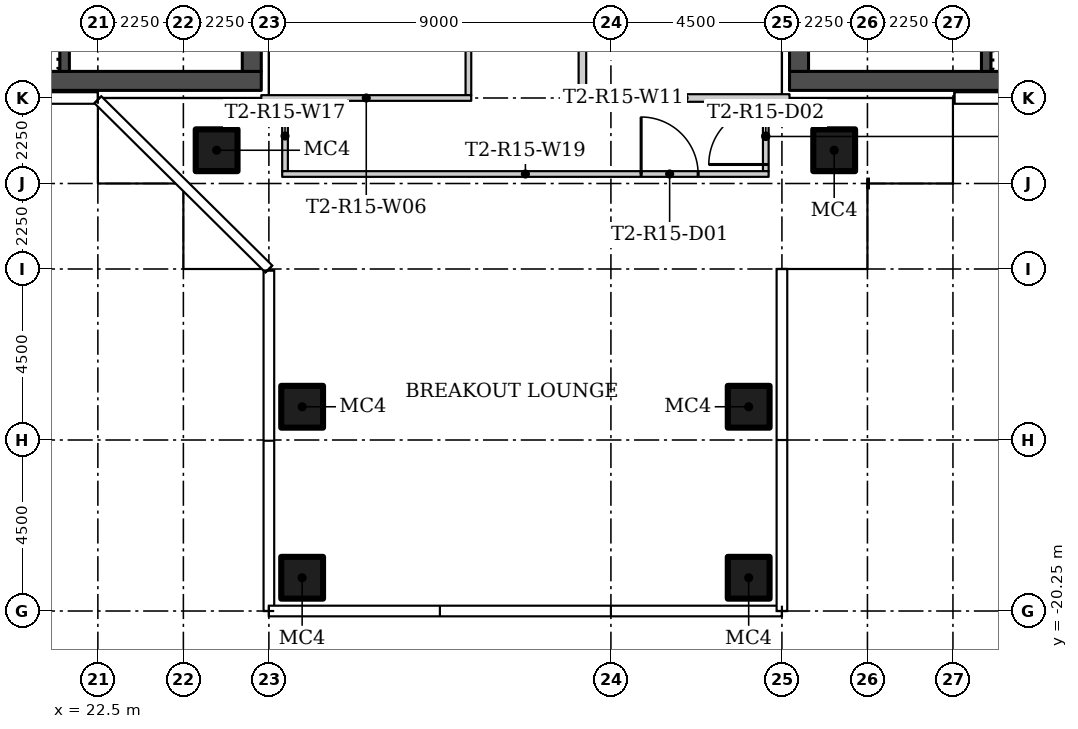
"""IFC4 building model, lengths in metres.
Left out: names, types, materials, properties, quantities, classifications, styles, units other than length and angle.
Written with IfcOpenShell. Run it as: python <this file> out.ifc"""

import sys

from ifc_helpers import new_model, si_unit, direction, frame, frame_2d, origin, origin_2d, place, context, subcontext, project, spatial, rectangle, hollow_rectangle, extrude, element, fill, save


model = new_model("IFC4")
c1 = context("Model", 3, precision=1e-05, world=origin(), true_north=direction((0.0, 1.0)))
c2 = subcontext(c1, "Body", "Model", "MODEL_VIEW")
j1 = project(units=[si_unit("LENGTHUNIT", "METRE"), si_unit("PLANEANGLEUNIT", "RADIAN")], contexts=[c1])
p1 = place(None, origin())
s1 = spatial("IfcSite", under=j1, at=p1, CompositionType="ELEMENT")
p2 = place(p1, origin())
s2 = spatial("IfcBuilding", under=s1, at=p2, CompositionType="ELEMENT")
p3 = place(p2, frame((0.0, 0.0, 142.8)))
s3 = spatial("IfcBuildingStorey", under=s2, at=p3, CompositionType="ELEMENT", Elevation=142.8)
for number, where in (
    (1, (25.625, -8.125, 0.0)),
    (2, (41.875, -8.125, 0.0)),
    (3, (39.625, -14.875, 0.0)),
    (4, (39.625, -19.375, 0.0)),
    (5, (27.875, -14.875, 0.0)),
    (6, (27.875, -19.375, 0.0)),
):
    element("IfcColumn", number, at=place(p3, frame(where)), inside=s3, PredefinedType="COLUMN", context=c2, shape_type="SweptSolid", body=[
        extrude(hollow_rectangle(XDim=1.1, YDim=1.1, WallThickness=0.04, at=origin_2d()), origin(), (0.0, 0.0, 1.0), 3.55),
    ])
p4 = place(p3, frame((32.25, -6.675, 0.0), z_axis=(0.0, 0.0, 1.0), x_axis=(0.0, 1.0, 0.0)))
e7 = element("IfcWall", 7, at=p4, inside=s3, PredefinedType="PARTITIONING", context=c2, shape_type="SweptSolid", body=[
    extrude(rectangle(XDim=6.65, YDim=0.15, at=frame_2d((3.325, 0.0))), origin(), (0.0, 0.0, 1.0), 3.55),
])
p5 = place(p4, frame((2.875, 0.0, 0.0)))
e8 = element("IfcOpeningElement", 8, at=p5, cuts=e7, PredefinedType="OPENING", context=c2, shape_type="SweptSolid", body=[
    extrude(rectangle(XDim=0.9, YDim=2.1, at=frame_2d((0.45, 1.05))), frame((0.0, 0.085, 0.0), z_axis=(0.0, -1.0, 0.0), x_axis=(1.0, 0.0, 0.0)), (0.0, 0.0, 1.0), 0.17),
])
p6 = place(p3, frame((26.8, -6.75, 0.0)))
e9 = element("IfcWall", 9, at=p6, inside=s3, PredefinedType="PARTITIONING", context=c2, shape_type="SweptSolid", body=[
    extrude(rectangle(XDim=5.525, YDim=0.15, at=frame_2d((2.762, 0.0))), origin(), (0.0, 0.0, 1.0), 3.55),
])
p7 = place(p3, frame((35.15, -6.75, 0.0)))
e10 = element("IfcWall", 10, at=p7, inside=s3, PredefinedType="PARTITIONING", context=c2, shape_type="SweptSolid", body=[
    extrude(rectangle(XDim=5.55, YDim=0.2, at=frame_2d((2.775, 0.0))), origin(), (0.0, 0.0, 1.0), 3.55),
])
p8 = place(p3, frame((35.25, -0.05, 0.0), z_axis=(0.0, 0.0, 1.0), x_axis=(0.0, -1.0, 0.0)))
e11 = element("IfcWall", 11, at=p8, inside=s3, PredefinedType="PARTITIONING", context=c2, shape_type="SweptSolid", body=[
    extrude(rectangle(XDim=6.6, YDim=0.2, at=frame_2d((3.3, 0.0))), origin(), (0.0, 0.0, 1.0), 3.55),
])
p9 = place(p8, frame((2.85, 0.0, 0.0)))
e12 = element("IfcOpeningElement", 12, at=p9, cuts=e11, PredefinedType="OPENING", context=c2, shape_type="SweptSolid", body=[
    extrude(rectangle(XDim=0.9, YDim=2.1, at=frame_2d((0.45, 1.05))), frame((0.0, 0.11, 0.0), z_axis=(0.0, -1.0, 0.0), x_axis=(1.0, 0.0, 0.0)), (0.0, 0.0, 1.0), 0.22),
])
p10 = place(p3, frame((40.075, -8.675, 0.0), z_axis=(0.0, 0.0, 1.0), x_axis=(0.0, 1.0, 0.0)))
e13 = element("IfcWall", 13, at=p10, inside=s3, PredefinedType="PARTITIONING", context=c2, shape_type="SweptSolid", body=[
    extrude(rectangle(XDim=1.825, YDim=0.15, at=frame_2d((0.913, 0.0))), origin(), (0.0, 0.0, 1.0), 3.55),
])
p11 = place(p10, frame((0.175, 0.0, 0.0)))
e14 = element("IfcOpeningElement", 14, at=p11, cuts=e13, PredefinedType="OPENING", context=c2, shape_type="SweptSolid", body=[
    extrude(rectangle(XDim=1.5, YDim=2.1, at=frame_2d((0.75, 1.05))), frame((0.0, 0.085, 0.0), z_axis=(0.0, -1.0, 0.0), x_axis=(1.0, 0.0, 0.0)), (0.0, 0.0, 1.0), 0.17),
])
p12 = place(p3, frame((27.425, -6.825, 0.0), z_axis=(0.0, 0.0, 1.0), x_axis=(0.0, -1.0, 0.0)))
e15 = element("IfcWall", 15, at=p12, inside=s3, PredefinedType="PARTITIONING", context=c2, shape_type="SweptSolid", body=[
    extrude(rectangle(XDim=1.85, YDim=0.15, at=frame_2d((0.925, 0.0))), origin(), (0.0, 0.0, 1.0), 3.55),
])
p13 = place(p3, frame((27.35, -8.75, 0.0)))
e16 = element("IfcWall", 16, at=p13, inside=s3, PredefinedType="PARTITIONING", context=c2, shape_type="SweptSolid", body=[
    extrude(rectangle(XDim=12.8, YDim=0.15, at=frame_2d((6.4, 0.0))), origin(), (0.0, 0.0, 1.0), 3.55),
])
p14 = place(p13, frame((9.445, 0.0, 0.0)))
e17 = element("IfcOpeningElement", 17, at=p14, cuts=e16, PredefinedType="OPENING", context=c2, shape_type="SweptSolid", body=[
    extrude(rectangle(XDim=1.5, YDim=2.1, at=frame_2d((0.75, 1.05))), frame((0.0, 0.085, 0.0), z_axis=(0.0, -1.0, 0.0), x_axis=(1.0, 0.0, 0.0)), (0.0, 0.0, 1.0), 0.17),
])
p15 = place(p3, frame((13.7, -6.3, 0.0)))
e18 = element("IfcWall", 18, at=p15, inside=s3, PredefinedType="SHEAR", context=c2, shape_type="SweptSolid", body=[
    extrude(rectangle(XDim=13.1, YDim=0.5, at=frame_2d((6.55, 0.0))), origin(), (0.0, 0.0, 1.0), 3.55),
])
p16 = place(p3, frame((26.55, 6.05, 0.0), z_axis=(0.0, 0.0, 1.0), x_axis=(0.0, -1.0, 0.0)))
e19 = element("IfcWall", 19, at=p16, inside=s3, PredefinedType="SHEAR", context=c2, shape_type="SweptSolid", body=[
    extrude(rectangle(XDim=12.1, YDim=0.5, at=frame_2d((6.05, 0.0))), origin(), (0.0, 0.0, 1.0), 3.55),
])
p17 = place(p16, frame((10.1, 0.0, 0.0)))
e20 = element("IfcOpeningElement", 20, at=p17, cuts=e19, PredefinedType="OPENING", context=c2, shape_type="SweptSolid", body=[
    extrude(rectangle(XDim=1.2, YDim=2.1, at=frame_2d((0.6, 1.05))), frame((0.0, 0.26, 0.0), z_axis=(0.0, -1.0, 0.0), x_axis=(1.0, 0.0, 0.0)), (0.0, 0.0, 1.0), 0.52),
])
p18 = place(p16, frame((3.9, 0.0, 0.0)))
e21 = element("IfcOpeningElement", 21, at=p18, cuts=e19, PredefinedType="OPENING", context=c2, shape_type="SweptSolid", body=[
    extrude(rectangle(XDim=1.8, YDim=2.4, at=frame_2d((0.9, 1.2))), frame((0.0, 0.26, 0.0), z_axis=(0.0, -1.0, 0.0), x_axis=(1.0, 0.0, 0.0)), (0.0, 0.0, 1.0), 0.52),
])
p19 = place(p3, frame((21.625, -6.05, 0.0), z_axis=(0.0, 0.0, 1.0), x_axis=(0.0, 1.0, 0.0)))
e22 = element("IfcWall", 22, at=p19, inside=s3, PredefinedType="SHEAR", context=c2, shape_type="SweptSolid", body=[
    extrude(rectangle(XDim=2.55, YDim=0.25, at=frame_2d((1.275, 0.0))), origin(), (0.0, 0.0, 1.0), 3.55),
])
p20 = place(p3, frame((53.8, -6.3, 0.0), z_axis=(0.0, 0.0, 1.0), x_axis=(-1.0, 0.0, 0.0)))
e23 = element("IfcWall", 23, at=p20, inside=s3, PredefinedType="SHEAR", context=c2, shape_type="SweptSolid", body=[
    extrude(rectangle(XDim=13.1, YDim=0.5, at=frame_2d((6.55, 0.0))), origin(), (0.0, 0.0, 1.0), 3.55),
])
p21 = place(p3, frame((40.95, -6.05, 0.0), z_axis=(0.0, 0.0, 1.0), x_axis=(0.0, 1.0, 0.0)))
e24 = element("IfcWall", 24, at=p21, inside=s3, PredefinedType="SHEAR", context=c2, shape_type="SweptSolid", body=[
    extrude(rectangle(XDim=12.1, YDim=0.5, at=frame_2d((6.05, 0.0))), origin(), (0.0, 0.0, 1.0), 3.55),
])
p22 = place(p21, frame((0.8, 0.0, 0.0)))
e25 = element("IfcOpeningElement", 25, at=p22, cuts=e24, PredefinedType="OPENING", context=c2, shape_type="SweptSolid", body=[
    extrude(rectangle(XDim=1.2, YDim=2.1, at=frame_2d((0.6, 1.05))), frame((0.0, 0.26, 0.0), z_axis=(0.0, -1.0, 0.0), x_axis=(1.0, 0.0, 0.0)), (0.0, 0.0, 1.0), 0.52),
])
p23 = place(p21, frame((6.4, 0.0, 0.0)))
e26 = element("IfcOpeningElement", 26, at=p23, cuts=e24, PredefinedType="OPENING", context=c2, shape_type="SweptSolid", body=[
    extrude(rectangle(XDim=1.8, YDim=2.4, at=frame_2d((0.9, 1.2))), frame((0.0, 0.26, 0.0), z_axis=(0.0, -1.0, 0.0), x_axis=(1.0, 0.0, 0.0)), (0.0, 0.0, 1.0), 0.52),
])
p24 = place(p3, frame((45.875, -6.05, 0.0), z_axis=(0.0, 0.0, 1.0), x_axis=(0.0, 1.0, 0.0)))
e27 = element("IfcWall", 27, at=p24, inside=s3, PredefinedType="SHEAR", context=c2, shape_type="SweptSolid", body=[
    extrude(rectangle(XDim=2.55, YDim=0.25, at=frame_2d((1.275, 0.0))), origin(), (0.0, 0.0, 1.0), 3.55),
])
p25 = place(p14, origin())
e28 = element("IfcDoor", 28, at=p25, inside=s3, OperationType="DOUBLE_DOOR_SINGLE_SWING", PredefinedType="DOOR", context=c2, shape_type="SweptSolid", body=[
    extrude(rectangle(XDim=1.5, YDim=2.1, at=frame_2d((0.75, 1.05))), frame((0.0, 0.025, 0.0), z_axis=(0.0, -1.0, 0.0), x_axis=(1.0, 0.0, 0.0)), (0.0, 0.0, 1.0), 0.05),
])
fill(e17, e28)
p26 = place(p11, origin())
e29 = element("IfcDoor", 29, at=p26, inside=s3, OperationType="DOUBLE_DOOR_SINGLE_SWING", PredefinedType="DOOR", context=c2, shape_type="SweptSolid", body=[
    extrude(rectangle(XDim=1.5, YDim=2.1, at=frame_2d((0.75, 1.05))), frame((0.0, 0.025, 0.0), z_axis=(0.0, -1.0, 0.0), x_axis=(1.0, 0.0, 0.0)), (0.0, 0.0, 1.0), 0.05),
])
fill(e14, e29)
save(model, sys.argv[1])
